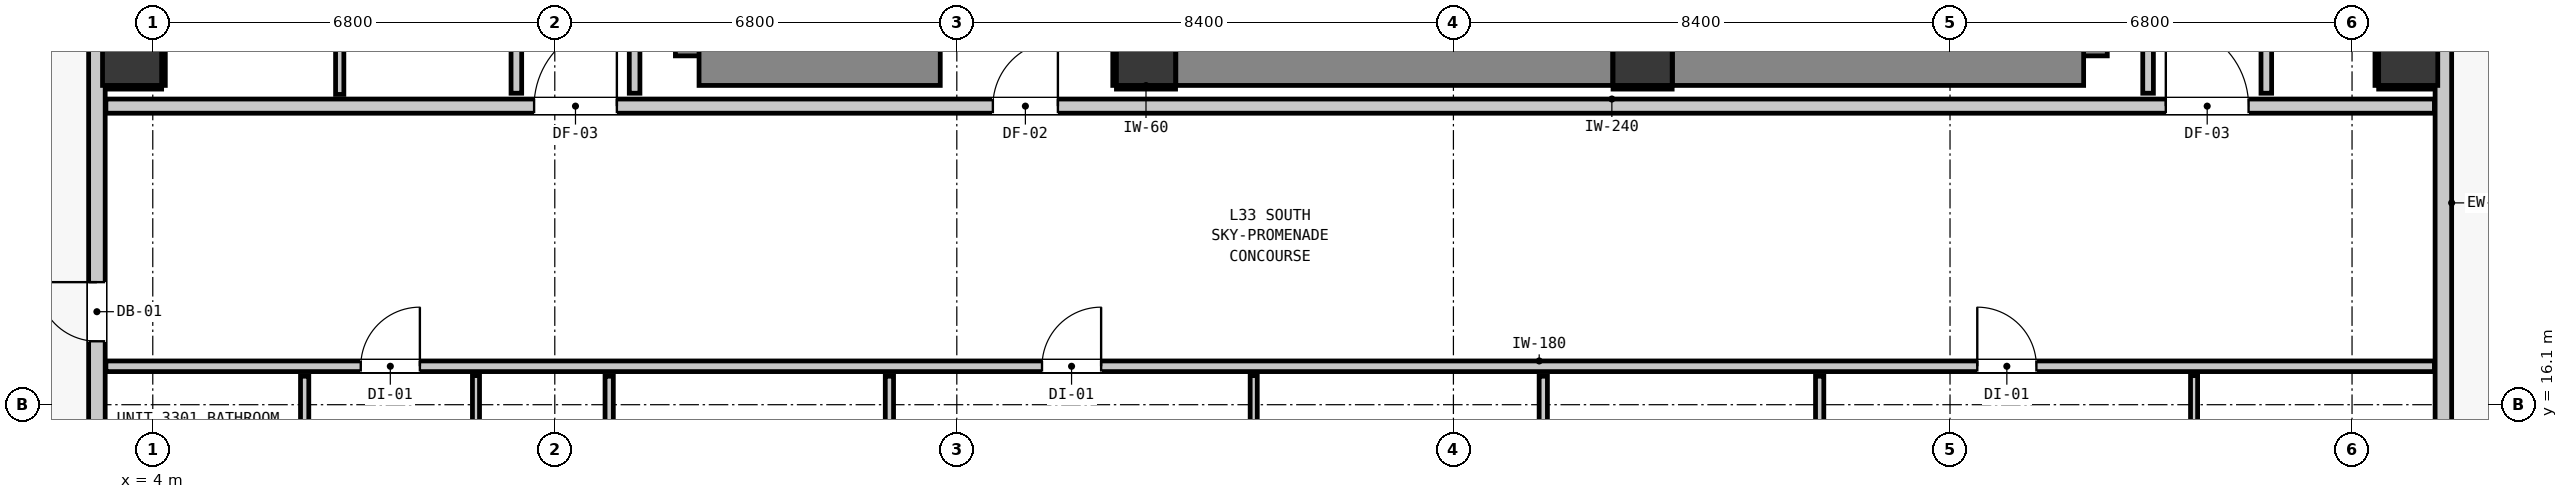
"""IFC4 building model, lengths in metres.
Left out: names, types, materials, properties, quantities, classifications, styles, units other than length and angle.
Written with IfcOpenShell. Run it as: python <this file> out.ifc"""

import sys

from ifc_helpers import new_model, si_unit, direction, frame, frame_2d, origin, origin_2d, place, context, subcontext, project, spatial, rectangle, extrude, element, fill, save


model = new_model("IFC4")
c1 = context("Model", 3, precision=1e-05, world=origin(), true_north=direction((0.0, 1.0)))
c2 = subcontext(c1, "Body", "Model", "MODEL_VIEW")
j1 = project(units=[si_unit("LENGTHUNIT", "METRE"), si_unit("PLANEANGLEUNIT", "RADIAN")], contexts=[c1])
p1 = place(None, origin())
s1 = spatial("IfcSite", under=j1, at=p1, CompositionType="ELEMENT")
p2 = place(p1, origin())
s2 = spatial("IfcBuilding", under=s1, at=p2, CompositionType="ELEMENT")
p3 = place(p2, frame((0.0, 0.0, 116.04)))
s3 = spatial("IfcBuildingStorey", under=s2, at=p3, CompositionType="ELEMENT", Elevation=116.04)
for number, where, z_axis, x_axis in (
    (1, (20.8, 22.0, 0.0), (0.0, 0.0, 1.0), (1.0, 0.0, 0.0)),
    (2, (29.2, 22.0, 0.0), (0.0, 0.0, 1.0), (1.0, 0.0, 0.0)),
):
    element("IfcColumn", number, at=place(p3, frame(where, z_axis=z_axis, x_axis=x_axis)), inside=s3, PredefinedType="COLUMN", context=c2, shape_type="SweptSolid", body=[
        extrude(rectangle(XDim=1.0, YDim=1.0, at=origin_2d()), origin(), (0.0, 0.0, 1.0), 3.32),
    ])
p4 = place(p3, frame((13.34, 22.0, 0.0), z_axis=(0.0, 0.0, 1.0), x_axis=(0.0, 1.0, 0.0)))
e3 = element("IfcWall", 3, at=p4, inside=s3, PredefinedType="SHEAR", context=c2, shape_type="SweptSolid", body=[
    extrude(rectangle(XDim=8.195, YDim=1.0, at=frame_2d((4.098, 0.0))), origin(), (0.0, 0.0, 1.0), 3.32),
])
p5 = place(p3, frame((13.24, 22.0, 0.0), z_axis=(0.0, 0.0, 1.0), x_axis=(1.0, 0.0, 0.0)))
e4 = element("IfcWall", 4, at=p5, inside=s3, PredefinedType="SHEAR", context=c2, shape_type="SweptSolid", body=[
    extrude(rectangle(XDim=4.08, YDim=1.0, at=frame_2d((2.04, 0.0))), origin(), (0.0, 0.0, 1.0), 3.32),
])
p6 = place(p3, frame((36.56, 22.0, 0.0), z_axis=(0.0, 0.0, 1.0), x_axis=(0.0, 1.0, 0.0)))
e5 = element("IfcWall", 5, at=p6, inside=s3, PredefinedType="SHEAR", context=c2, shape_type="SweptSolid", body=[
    extrude(rectangle(XDim=8.195, YDim=1.0, at=frame_2d((4.098, 0.0))), origin(), (0.0, 0.0, 1.0), 3.32),
])
p7 = place(p3, frame((29.705, 22.0, 0.0), z_axis=(0.0, 0.0, 1.0), x_axis=(1.0, 0.0, 0.0)))
e6 = element("IfcWall", 6, at=p7, inside=s3, PredefinedType="SHEAR", context=c2, shape_type="SweptSolid", body=[
    extrude(rectangle(XDim=6.955, YDim=1.0, at=frame_2d((3.478, 0.0))), origin(), (0.0, 0.0, 1.0), 3.32),
])
p8 = place(p3, frame((21.305, 22.0, 0.0), z_axis=(0.0, 0.0, 1.0), x_axis=(1.0, 0.0, 0.0)))
e7 = element("IfcWall", 7, at=p8, inside=s3, PredefinedType="SHEAR", context=c2, shape_type="SweptSolid", body=[
    extrude(rectangle(XDim=7.39, YDim=1.0, at=frame_2d((3.695, 0.0))), origin(), (0.0, 0.0, 1.0), 3.32),
])
for number, where, z_axis, x_axis in (
    (8, (3.65, 22.0, 0.0), (0.0, 0.0, 1.0), (1.0, 0.0, 0.0)),
    (9, (42.15, 22.0, 0.0), (0.0, 0.0, 1.0), (1.0, 0.0, 0.0)),
):
    element("IfcColumn", number, at=place(p3, frame(where, z_axis=z_axis, x_axis=x_axis)), inside=s3, PredefinedType="COLUMN", context=c2, shape_type="SweptSolid", body=[
        extrude(rectangle(XDim=1.0, YDim=1.0, at=origin_2d()), origin(), (0.0, 0.0, 1.0), 3.32),
    ])
p9 = place(p3, frame((3.055, 11.355, 0.0), z_axis=(0.0, 0.0, 1.0), x_axis=(0.0, 1.0, 0.0)))
e10 = element("IfcWall", 10, at=p9, inside=s3, PredefinedType="STANDARD", context=c2, shape_type="SweptSolid", body=[
    extrude(rectangle(XDim=32.29, YDim=0.28, at=frame_2d((16.145, 0.0))), origin(), (0.0, 0.0, 1.0), 3.08),
])
p10 = place(p9, frame((5.818, 0.0, 0.0)))
e11 = element("IfcOpeningElement", 11, at=p10, cuts=e10, PredefinedType="OPENING", context=c2, shape_type="SweptSolid", body=[
    extrude(rectangle(XDim=1.0, YDim=2.15, at=frame_2d((0.5, 1.075))), frame((0.0, 0.15, 0.0), z_axis=(0.0, -1.0, 0.0), x_axis=(1.0, 0.0, 0.0)), (0.0, 0.0, 1.0), 0.3),
])
p11 = place(p9, frame((0.52, 0.0, 0.85)))
e12 = element("IfcOpeningElement", 12, at=p11, cuts=e10, PredefinedType="OPENING", context=c2, shape_type="SweptSolid", body=[
    extrude(rectangle(XDim=1.1, YDim=2.05, at=frame_2d((0.55, 1.025))), frame((0.0, 0.15, 0.0), z_axis=(0.0, -1.0, 0.0), x_axis=(1.0, 0.0, 0.0)), (0.0, 0.0, 1.0), 0.3),
])
p12 = place(p9, frame((20.905, 0.0, 0.85)))
e13 = element("IfcOpeningElement", 13, at=p12, cuts=e10, PredefinedType="OPENING", context=c2, shape_type="SweptSolid", body=[
    extrude(rectangle(XDim=1.1, YDim=2.05, at=frame_2d((0.55, 1.025))), frame((0.0, 0.15, 0.0), z_axis=(0.0, -1.0, 0.0), x_axis=(1.0, 0.0, 0.0)), (0.0, 0.0, 1.0), 0.3),
])
p13 = place(p9, frame((12.735, 0.0, 0.85)))
e14 = element("IfcOpeningElement", 14, at=p13, cuts=e10, PredefinedType="OPENING", context=c2, shape_type="SweptSolid", body=[
    extrude(rectangle(XDim=1.1, YDim=2.05, at=frame_2d((0.55, 1.025))), frame((0.0, 0.15, 0.0), z_axis=(0.0, -1.0, 0.0), x_axis=(1.0, 0.0, 0.0)), (0.0, 0.0, 1.0), 0.3),
])
p14 = place(p9, frame((24.855, 0.0, 0.85)))
e15 = element("IfcOpeningElement", 15, at=p14, cuts=e10, PredefinedType="OPENING", context=c2, shape_type="SweptSolid", body=[
    extrude(rectangle(XDim=1.1, YDim=2.05, at=frame_2d((0.55, 1.025))), frame((0.0, 0.15, 0.0), z_axis=(0.0, -1.0, 0.0), x_axis=(1.0, 0.0, 0.0)), (0.0, 0.0, 1.0), 0.3),
])
p15 = place(p3, frame((42.745, 43.645, 0.0), z_axis=(0.0, 0.0, 1.0), x_axis=(0.0, -1.0, 0.0)))
e16 = element("IfcWall", 16, at=p15, inside=s3, PredefinedType="STANDARD", context=c2, shape_type="SweptSolid", body=[
    extrude(rectangle(XDim=32.29, YDim=0.28, at=frame_2d((16.145, 0.0))), origin(), (0.0, 0.0, 1.0), 3.08),
])
p16 = place(p15, frame((5.467, 0.0, 0.0)))
e17 = element("IfcOpeningElement", 17, at=p16, cuts=e16, PredefinedType="OPENING", context=c2, shape_type="SweptSolid", body=[
    extrude(rectangle(XDim=1.0, YDim=2.15, at=frame_2d((0.5, 1.075))), frame((0.0, 0.15, 0.0), z_axis=(0.0, -1.0, 0.0), x_axis=(1.0, 0.0, 0.0)), (0.0, 0.0, 1.0), 0.3),
])
p17 = place(p15, frame((0.293, 0.0, 0.85)))
e18 = element("IfcOpeningElement", 18, at=p17, cuts=e16, PredefinedType="OPENING", context=c2, shape_type="SweptSolid", body=[
    extrude(rectangle(XDim=1.1, YDim=2.05, at=frame_2d((0.55, 1.025))), frame((0.0, 0.15, 0.0), z_axis=(0.0, -1.0, 0.0), x_axis=(1.0, 0.0, 0.0)), (0.0, 0.0, 1.0), 0.3),
])
p18 = place(p15, frame((14.773, 0.0, 0.85)))
e19 = element("IfcOpeningElement", 19, at=p18, cuts=e16, PredefinedType="OPENING", context=c2, shape_type="SweptSolid", body=[
    extrude(rectangle(XDim=1.1, YDim=2.05, at=frame_2d((0.55, 1.025))), frame((0.0, 0.15, 0.0), z_axis=(0.0, -1.0, 0.0), x_axis=(1.0, 0.0, 0.0)), (0.0, 0.0, 1.0), 0.3),
])
p19 = place(p3, frame((3.207, 21.15, 0.0), z_axis=(0.0, 0.0, 1.0), x_axis=(1.0, 0.0, 0.0)))
e20 = element("IfcWall", 20, at=p19, inside=s3, PredefinedType="PARTITIONING", context=c2, shape_type="SweptSolid", body=[
    extrude(rectangle(XDim=39.386, YDim=0.24, at=frame_2d((19.693, 0.0))), origin(), (0.0, 0.0, 1.0), 3.08),
])
p20 = place(p19, frame((15.003, 0.0, 0.0)))
e21 = element("IfcOpeningElement", 21, at=p20, cuts=e20, PredefinedType="OPENING", context=c2, shape_type="SweptSolid", body=[
    extrude(rectangle(XDim=1.1, YDim=2.15, at=frame_2d((0.55, 1.075))), frame((0.0, 0.13, 0.0), z_axis=(0.0, -1.0, 0.0), x_axis=(1.0, 0.0, 0.0)), (0.0, 0.0, 1.0), 0.26),
])
p21 = place(p19, frame((7.243, 0.0, 0.0)))
e22 = element("IfcOpeningElement", 22, at=p21, cuts=e20, PredefinedType="OPENING", context=c2, shape_type="SweptSolid", body=[
    extrude(rectangle(XDim=1.4, YDim=2.15, at=frame_2d((0.7, 1.075))), frame((0.0, 0.13, 0.0), z_axis=(0.0, -1.0, 0.0), x_axis=(1.0, 0.0, 0.0)), (0.0, 0.0, 1.0), 0.26),
])
p22 = place(p19, frame((34.843, 0.0, 0.0)))
e23 = element("IfcOpeningElement", 23, at=p22, cuts=e20, PredefinedType="OPENING", context=c2, shape_type="SweptSolid", body=[
    extrude(rectangle(XDim=1.4, YDim=2.15, at=frame_2d((0.7, 1.075))), frame((0.0, 0.13, 0.0), z_axis=(0.0, -1.0, 0.0), x_axis=(1.0, 0.0, 0.0)), (0.0, 0.0, 1.0), 0.26),
])
p23 = place(p3, frame((3.207, 16.75, 0.0), z_axis=(0.0, 0.0, 1.0), x_axis=(1.0, 0.0, 0.0)))
e24 = element("IfcWall", 24, at=p23, inside=s3, PredefinedType="PARTITIONING", context=c2, shape_type="SweptSolid", body=[
    extrude(rectangle(XDim=39.386, YDim=0.18, at=frame_2d((19.693, 0.0))), origin(), (0.0, 0.0, 1.0), 3.08),
])
p24 = place(p23, frame((4.311, 0.0, 0.0)))
e25 = element("IfcOpeningElement", 25, at=p24, cuts=e24, PredefinedType="OPENING", context=c2, shape_type="SweptSolid", body=[
    extrude(rectangle(XDim=1.0, YDim=2.15, at=frame_2d((0.5, 1.075))), frame((0.0, 0.1, 0.0), z_axis=(0.0, -1.0, 0.0), x_axis=(1.0, 0.0, 0.0)), (0.0, 0.0, 1.0), 0.2),
])
p25 = place(p23, frame((15.834, 0.0, 0.0)))
e26 = element("IfcOpeningElement", 26, at=p25, cuts=e24, PredefinedType="OPENING", context=c2, shape_type="SweptSolid", body=[
    extrude(rectangle(XDim=1.0, YDim=2.15, at=frame_2d((0.5, 1.075))), frame((0.0, 0.1, 0.0), z_axis=(0.0, -1.0, 0.0), x_axis=(1.0, 0.0, 0.0)), (0.0, 0.0, 1.0), 0.2),
])
p26 = place(p23, frame((31.654, 0.0, 0.0)))
e27 = element("IfcOpeningElement", 27, at=p26, cuts=e24, PredefinedType="OPENING", context=c2, shape_type="SweptSolid", body=[
    extrude(rectangle(XDim=1.0, YDim=2.15, at=frame_2d((0.5, 1.075))), frame((0.0, 0.1, 0.0), z_axis=(0.0, -1.0, 0.0), x_axis=(1.0, 0.0, 0.0)), (0.0, 0.0, 1.0), 0.2),
])
p27 = place(p3, frame((10.15, 21.368, 0.0), z_axis=(0.0, 0.0, 1.0), x_axis=(0.0, 1.0, 0.0)))
e28 = element("IfcWall", 28, at=p27, inside=s3, PredefinedType="PARTITIONING", context=c2, shape_type="SweptSolid", body=[
    extrude(rectangle(XDim=5.354, YDim=0.18, at=frame_2d((2.677, 0.0))), origin(), (0.0, 0.0, 1.0), 3.08),
])
for number, where, z_axis, x_axis in (
    (29, (12.15, 21.368, 0.0), (0.0, 0.0, 1.0), (0.0, 1.0, 0.0)),
    (30, (37.75, 21.368, 0.0), (0.0, 0.0, 1.0), (0.0, 1.0, 0.0)),
):
    element("IfcWall", number, at=place(p3, frame(where, z_axis=z_axis, x_axis=x_axis)), inside=s3, PredefinedType="PARTITIONING", context=c2, shape_type="SweptSolid", body=[
        extrude(rectangle(XDim=18.694, YDim=0.18, at=frame_2d((9.347, 0.0))), origin(), (0.0, 0.0, 1.0), 3.08),
    ])
p28 = place(p3, frame((39.75, 21.368, 0.0), z_axis=(0.0, 0.0, 1.0), x_axis=(0.0, 1.0, 0.0)))
e31 = element("IfcWall", 31, at=p28, inside=s3, PredefinedType="PARTITIONING", context=c2, shape_type="SweptSolid", body=[
    extrude(rectangle(XDim=4.809, YDim=0.18, at=frame_2d((2.405, 0.0))), origin(), (0.0, 0.0, 1.0), 3.08),
])
p29 = place(p3, frame((6.569, 13.652, 0.0), z_axis=(0.0, 0.0, 1.0), x_axis=(0.0, 1.0, 0.0)))
e32 = element("IfcWall", 32, at=p29, inside=s3, PredefinedType="PARTITIONING", context=c2, shape_type="SweptSolid", body=[
    extrude(rectangle(XDim=2.93, YDim=0.14, at=frame_2d((1.465, 0.0))), origin(), (0.0, 0.0, 1.0), 3.08),
])
p30 = place(p29, frame((1.032, 0.0, 0.0)))
e33 = element("IfcOpeningElement", 33, at=p30, cuts=e32, PredefinedType="OPENING", context=c2, shape_type="SweptSolid", body=[
    extrude(rectangle(XDim=0.86, YDim=2.02, at=frame_2d((0.43, 1.01))), frame((0.0, 0.08, 0.0), z_axis=(0.0, -1.0, 0.0), x_axis=(1.0, 0.0, 0.0)), (0.0, 0.0, 1.0), 0.16),
])
p31 = place(p3, frame((7.162, 21.348, 0.0), z_axis=(0.0, 0.0, 1.0), x_axis=(0.0, 1.0, 0.0)))
e34 = element("IfcWall", 34, at=p31, inside=s3, PredefinedType="PARTITIONING", context=c2, shape_type="SweptSolid", body=[
    extrude(rectangle(XDim=5.394, YDim=0.14, at=frame_2d((2.697, 0.0))), origin(), (0.0, 0.0, 1.0), 3.08),
])
p32 = place(p3, frame((11.72, 13.652, 0.0), z_axis=(0.0, 0.0, 1.0), x_axis=(0.0, 1.0, 0.0)))
e35 = element("IfcWall", 35, at=p32, inside=s3, PredefinedType="PARTITIONING", context=c2, shape_type="SweptSolid", body=[
    extrude(rectangle(XDim=2.93, YDim=0.14, at=frame_2d((1.465, 0.0))), origin(), (0.0, 0.0, 1.0), 3.08),
])
p33 = place(p3, frame((16.46, 13.652, 0.0), z_axis=(0.0, 0.0, 1.0), x_axis=(0.0, 1.0, 0.0)))
e36 = element("IfcWall", 36, at=p33, inside=s3, PredefinedType="PARTITIONING", context=c2, shape_type="SweptSolid", body=[
    extrude(rectangle(XDim=2.93, YDim=0.14, at=frame_2d((1.465, 0.0))), origin(), (0.0, 0.0, 1.0), 3.08),
])
p34 = place(p33, frame((1.032, 0.0, 0.0)))
e37 = element("IfcOpeningElement", 37, at=p34, cuts=e36, PredefinedType="OPENING", context=c2, shape_type="SweptSolid", body=[
    extrude(rectangle(XDim=0.86, YDim=2.02, at=frame_2d((0.43, 1.01))), frame((0.0, 0.08, 0.0), z_axis=(0.0, -1.0, 0.0), x_axis=(1.0, 0.0, 0.0)), (0.0, 0.0, 1.0), 0.16),
])
p35 = place(p3, frame((27.52, 13.652, 0.0), z_axis=(0.0, 0.0, 1.0), x_axis=(0.0, 1.0, 0.0)))
e38 = element("IfcWall", 38, at=p35, inside=s3, PredefinedType="PARTITIONING", context=c2, shape_type="SweptSolid", body=[
    extrude(rectangle(XDim=2.93, YDim=0.14, at=frame_2d((1.465, 0.0))), origin(), (0.0, 0.0, 1.0), 3.08),
])
p36 = place(p3, frame((32.195, 13.652, 0.0), z_axis=(0.0, 0.0, 1.0), x_axis=(0.0, 1.0, 0.0)))
e39 = element("IfcWall", 39, at=p36, inside=s3, PredefinedType="PARTITIONING", context=c2, shape_type="SweptSolid", body=[
    extrude(rectangle(XDim=2.93, YDim=0.14, at=frame_2d((1.465, 0.0))), origin(), (0.0, 0.0, 1.0), 3.08),
])
p37 = place(p36, frame((1.032, 0.0, 0.0)))
e40 = element("IfcOpeningElement", 40, at=p37, cuts=e39, PredefinedType="OPENING", context=c2, shape_type="SweptSolid", body=[
    extrude(rectangle(XDim=0.86, YDim=2.02, at=frame_2d((0.43, 1.01))), frame((0.0, 0.08, 0.0), z_axis=(0.0, -1.0, 0.0), x_axis=(1.0, 0.0, 0.0)), (0.0, 0.0, 1.0), 0.16),
])
p38 = place(p3, frame((9.467, 9.207, 0.0), z_axis=(0.0, 0.0, 1.0), x_axis=(0.0, 1.0, 0.0)))
e41 = element("IfcWall", 41, at=p38, inside=s3, PredefinedType="PARTITIONING", context=c2, shape_type="SweptSolid", body=[
    extrude(rectangle(XDim=7.385, YDim=0.12, at=frame_2d((3.692, 0.0))), origin(), (0.0, 0.0, 1.0), 3.08),
])
p39 = place(p38, frame((3.318, 0.0, 0.0)))
e42 = element("IfcOpeningElement", 42, at=p39, cuts=e41, PredefinedType="OPENING", context=c2, shape_type="SweptSolid", body=[
    extrude(rectangle(XDim=0.9, YDim=2.1, at=frame_2d((0.45, 1.05))), frame((0.0, 0.07, 0.0), z_axis=(0.0, -1.0, 0.0), x_axis=(1.0, 0.0, 0.0)), (0.0, 0.0, 1.0), 0.14),
])
p40 = place(p3, frame((22.622, 13.642, 0.0), z_axis=(0.0, 0.0, 1.0), x_axis=(0.0, 1.0, 0.0)))
e43 = element("IfcWall", 43, at=p40, inside=s3, PredefinedType="PARTITIONING", context=c2, shape_type="SweptSolid", body=[
    extrude(rectangle(XDim=2.95, YDim=0.12, at=frame_2d((1.475, 0.0))), origin(), (0.0, 0.0, 1.0), 3.08),
])
p41 = place(p40, frame((1.022, 0.0, 0.0)))
e44 = element("IfcOpeningElement", 44, at=p41, cuts=e43, PredefinedType="OPENING", context=c2, shape_type="SweptSolid", body=[
    extrude(rectangle(XDim=0.9, YDim=2.1, at=frame_2d((0.45, 1.05))), frame((0.0, 0.07, 0.0), z_axis=(0.0, -1.0, 0.0), x_axis=(1.0, 0.0, 0.0)), (0.0, 0.0, 1.0), 0.14),
])
p42 = place(p3, frame((38.528, 10.101, 0.0), z_axis=(0.0, 0.0, 1.0), x_axis=(0.0, 1.0, 0.0)))
e45 = element("IfcWall", 45, at=p42, inside=s3, PredefinedType="PARTITIONING", context=c2, shape_type="SweptSolid", body=[
    extrude(rectangle(XDim=6.491, YDim=0.12, at=frame_2d((3.246, 0.0))), origin(), (0.0, 0.0, 1.0), 2.565),
])
p43 = place(p42, frame((2.424, 0.0, 0.0)))
e46 = element("IfcOpeningElement", 46, at=p43, cuts=e45, PredefinedType="OPENING", context=c2, shape_type="SweptSolid", body=[
    extrude(rectangle(XDim=0.9, YDim=2.1, at=frame_2d((0.45, 1.05))), frame((0.0, 0.07, 0.0), z_axis=(0.0, -1.0, 0.0), x_axis=(1.0, 0.0, 0.0)), (0.0, 0.0, 1.0), 0.14),
])
for number, where, z_axis, x_axis in (
    (47, (20.3, 21.468, 0.0), (0.0, 0.0, 1.0), (1.0, 0.0, 0.0)),
    (48, (20.268, 21.5, 0.0), (0.0, 0.0, 1.0), (0.0, 1.0, 0.0)),
    (49, (28.7, 21.468, 0.0), (0.0, 0.0, 1.0), (1.0, 0.0, 0.0)),
):
    element("IfcWall", number, at=place(p3, frame(where, z_axis=z_axis, x_axis=x_axis)), inside=s3, PredefinedType="PARTITIONING", context=c2, shape_type="SweptSolid", body=[
        extrude(rectangle(XDim=1.0, YDim=0.06, at=frame_2d((0.5, 0.0))), origin(), (0.0, 0.0, 1.0), 1.45),
    ])
p44 = place(p3, frame((3.21, 21.468, 0.0), z_axis=(0.0, 0.0, 1.0), x_axis=(1.0, 0.0, 0.0)))
e50 = element("IfcWall", 50, at=p44, inside=s3, PredefinedType="PARTITIONING", context=c2, shape_type="SweptSolid", body=[
    extrude(rectangle(XDim=0.94, YDim=0.06, at=frame_2d((0.47, 0.0))), origin(), (0.0, 0.0, 1.0), 1.45),
])
p45 = place(p3, frame((4.182, 21.5, 0.0), z_axis=(0.0, 0.0, 1.0), x_axis=(0.0, 1.0, 0.0)))
e51 = element("IfcWall", 51, at=p45, inside=s3, PredefinedType="PARTITIONING", context=c2, shape_type="SweptSolid", body=[
    extrude(rectangle(XDim=1.0, YDim=0.06, at=frame_2d((0.5, 0.0))), origin(), (0.0, 0.0, 1.0), 1.45),
])
p46 = place(p3, frame((41.65, 21.468, 0.0), z_axis=(0.0, 0.0, 1.0), x_axis=(1.0, 0.0, 0.0)))
e52 = element("IfcWall", 52, at=p46, inside=s3, PredefinedType="PARTITIONING", context=c2, shape_type="SweptSolid", body=[
    extrude(rectangle(XDim=0.94, YDim=0.06, at=frame_2d((0.47, 0.0))), origin(), (0.0, 0.0, 1.0), 1.45),
])
p47 = place(p3, frame((41.618, 21.5, 0.0), z_axis=(0.0, 0.0, 1.0), x_axis=(0.0, 1.0, 0.0)))
e53 = element("IfcWall", 53, at=p47, inside=s3, PredefinedType="PARTITIONING", context=c2, shape_type="SweptSolid", body=[
    extrude(rectangle(XDim=1.0, YDim=0.06, at=frame_2d((0.5, 0.0))), origin(), (0.0, 0.0, 1.0), 1.45),
])
p48 = place(p10, origin())
e54 = element("IfcDoor", 54, at=p48, inside=s3, OperationType="SINGLE_SWING_RIGHT", PredefinedType="DOOR", context=c2, shape_type="SweptSolid", body=[
    extrude(rectangle(XDim=1.0, YDim=2.15, at=frame_2d((0.5, 1.075))), frame((0.0, 0.025, 0.0), z_axis=(0.0, -1.0, 0.0), x_axis=(1.0, 0.0, 0.0)), (0.0, 0.0, 1.0), 0.05),
])
fill(e11, e54)
p49 = place(p20, origin())
e55 = element("IfcDoor", 55, at=p49, inside=s3, OperationType="SINGLE_SWING_RIGHT", PredefinedType="DOOR", context=c2, shape_type="SweptSolid", body=[
    extrude(rectangle(XDim=1.1, YDim=2.15, at=frame_2d((0.55, 1.075))), frame((0.0, 0.025, 0.0), z_axis=(0.0, -1.0, 0.0), x_axis=(1.0, 0.0, 0.0)), (0.0, 0.0, 1.0), 0.05),
])
fill(e21, e55)
p50 = place(p21, origin())
e56 = element("IfcDoor", 56, at=p50, inside=s3, OperationType="SINGLE_SWING_RIGHT", PredefinedType="DOOR", context=c2, shape_type="SweptSolid", body=[
    extrude(rectangle(XDim=1.4, YDim=2.15, at=frame_2d((0.7, 1.075))), frame((0.0, 0.025, 0.0), z_axis=(0.0, -1.0, 0.0), x_axis=(1.0, 0.0, 0.0)), (0.0, 0.0, 1.0), 0.05),
])
fill(e22, e56)
p51 = place(p22, origin())
e57 = element("IfcDoor", 57, at=p51, inside=s3, OperationType="SINGLE_SWING_LEFT", PredefinedType="DOOR", context=c2, shape_type="SweptSolid", body=[
    extrude(rectangle(XDim=1.4, YDim=2.15, at=frame_2d((0.7, 1.075))), frame((0.0, 0.025, 0.0), z_axis=(0.0, -1.0, 0.0), x_axis=(1.0, 0.0, 0.0)), (0.0, 0.0, 1.0), 0.05),
])
fill(e23, e57)
p52 = place(p24, origin())
e58 = element("IfcDoor", 58, at=p52, inside=s3, OperationType="SINGLE_SWING_RIGHT", PredefinedType="DOOR", context=c2, shape_type="SweptSolid", body=[
    extrude(rectangle(XDim=1.0, YDim=2.15, at=frame_2d((0.5, 1.075))), frame((0.0, 0.025, 0.0), z_axis=(0.0, -1.0, 0.0), x_axis=(1.0, 0.0, 0.0)), (0.0, 0.0, 1.0), 0.05),
])
fill(e25, e58)
p53 = place(p25, origin())
e59 = element("IfcDoor", 59, at=p53, inside=s3, OperationType="SINGLE_SWING_RIGHT", PredefinedType="DOOR", context=c2, shape_type="SweptSolid", body=[
    extrude(rectangle(XDim=1.0, YDim=2.15, at=frame_2d((0.5, 1.075))), frame((0.0, 0.025, 0.0), z_axis=(0.0, -1.0, 0.0), x_axis=(1.0, 0.0, 0.0)), (0.0, 0.0, 1.0), 0.05),
])
fill(e26, e59)
p54 = place(p26, origin())
e60 = element("IfcDoor", 60, at=p54, inside=s3, OperationType="SINGLE_SWING_LEFT", PredefinedType="DOOR", context=c2, shape_type="SweptSolid", body=[
    extrude(rectangle(XDim=1.0, YDim=2.15, at=frame_2d((0.5, 1.075))), frame((0.0, 0.025, 0.0), z_axis=(0.0, -1.0, 0.0), x_axis=(1.0, 0.0, 0.0)), (0.0, 0.0, 1.0), 0.05),
])
fill(e27, e60)
save(model, sys.argv[1])
